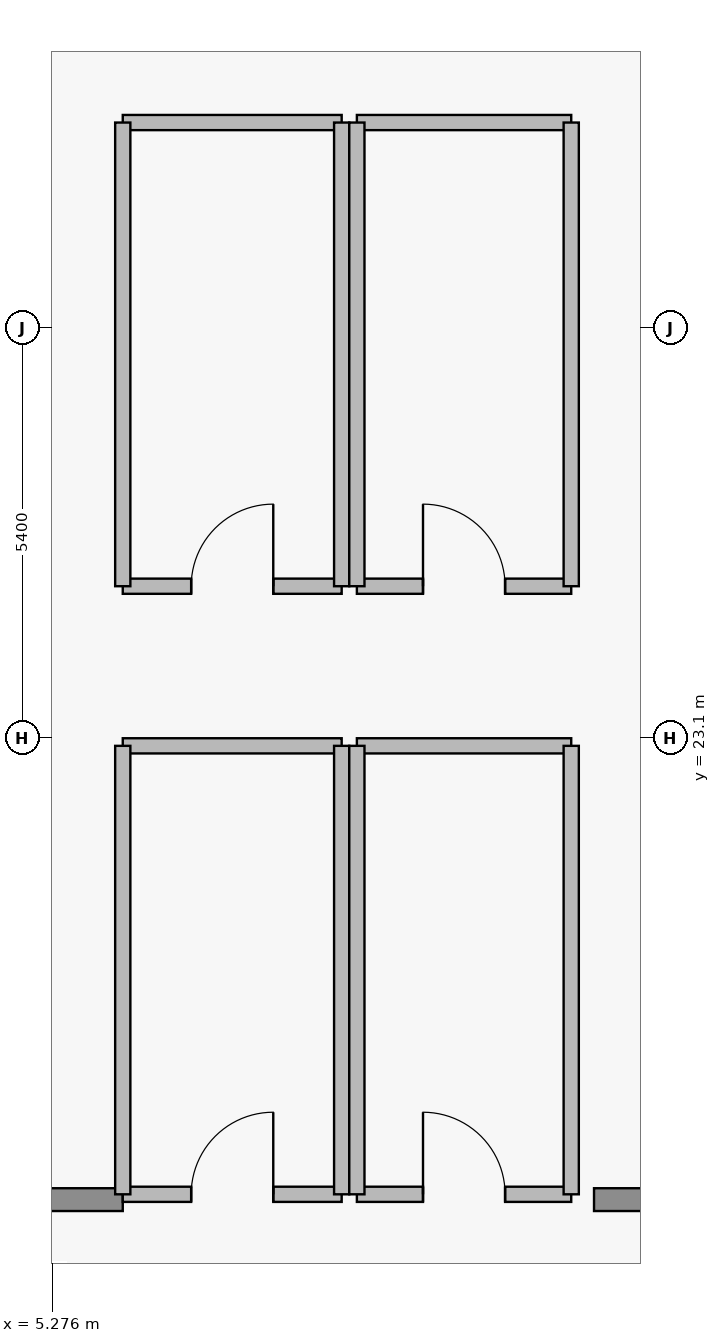
"""IFC4 building model, lengths in metres.
Left out: names, types, materials, properties, quantities, classifications, styles, units other than length and angle.
Written with IfcOpenShell. Run it as: python <this file> out.ifc"""

import sys

from ifc_helpers import new_model, si_unit, direction, frame, frame_2d, origin, place, context, subcontext, project, spatial, rectangle, extrude, element, fill, save


model = new_model("IFC4")
c1 = context("Model", 3, precision=1e-05, world=origin(), true_north=direction((0.0, 1.0)))
c2 = subcontext(c1, "Body", "Model", "MODEL_VIEW")
j1 = project(units=[si_unit("LENGTHUNIT", "METRE"), si_unit("PLANEANGLEUNIT", "RADIAN")], contexts=[c1])
p1 = place(None, origin())
s1 = spatial("IfcSite", under=j1, at=p1, CompositionType="ELEMENT")
p2 = place(p1, origin())
s2 = spatial("IfcBuilding", under=s1, at=p2, CompositionType="ELEMENT")
p3 = place(p2, frame((0.0, 0.0, 233.65)))
s3 = spatial("IfcBuildingStorey", under=s2, at=p3, CompositionType="ELEMENT", Elevation=233.65)
p4 = place(p3, frame((12.4, 17.03, 0.0), z_axis=(0.0, 0.0, 1.0), x_axis=(1.0, 0.0, 0.0)))
e1 = element("IfcWall", 1, at=p4, inside=s3, PredefinedType="STANDARD", context=c2, shape_type="SweptSolid", body=[
    extrude(rectangle(XDim=3.1, YDim=0.3, at=frame_2d((1.55, 0.0))), origin(), (0.0, 0.0, 1.0), 5.74),
])
p5 = place(p3, frame((1.05, 17.03, 0.0), z_axis=(0.0, 0.0, 1.0), x_axis=(1.0, 0.0, 0.0)))
e2 = element("IfcWall", 2, at=p5, inside=s3, PredefinedType="STANDARD", context=c2, shape_type="SweptSolid", body=[
    extrude(rectangle(XDim=5.15, YDim=0.3, at=frame_2d((2.575, 0.0))), origin(), (0.0, 0.0, 1.0), 5.74),
])
p6 = place(p3, frame((6.2, 17.1, 0.0), z_axis=(0.0, 0.0, 1.0), x_axis=(1.0, 0.0, 0.0)))
e3 = element("IfcWall", 3, at=p6, inside=s3, PredefinedType="PARTITIONING", context=c2, shape_type="SweptSolid", body=[
    extrude(rectangle(XDim=2.88, YDim=0.2, at=frame_2d((1.44, 0.0))), origin(), (0.0, 0.0, 1.0), 5.74),
])
p7 = place(p6, frame((0.9, 0.0, 0.0)))
e4 = element("IfcOpeningElement", 4, at=p7, cuts=e3, PredefinedType="OPENING", context=c2, shape_type="SweptSolid", body=[
    extrude(rectangle(XDim=1.08, YDim=2.18, at=frame_2d((0.54, 1.09))), frame((0.0, 0.11, 0.0), z_axis=(0.0, -1.0, 0.0), x_axis=(1.0, 0.0, 0.0)), (0.0, 0.0, 1.0), 0.22),
])
p8 = place(p3, frame((9.28, 17.1, 0.0), z_axis=(0.0, 0.0, 1.0), x_axis=(1.0, 0.0, 0.0)))
e5 = element("IfcWall", 5, at=p8, inside=s3, PredefinedType="PARTITIONING", context=c2, shape_type="SweptSolid", body=[
    extrude(rectangle(XDim=2.82, YDim=0.2, at=frame_2d((1.41, 0.0))), origin(), (0.0, 0.0, 1.0), 5.74),
])
p9 = place(p8, frame((0.87, 0.0, 0.0)))
e6 = element("IfcOpeningElement", 6, at=p9, cuts=e5, PredefinedType="OPENING", context=c2, shape_type="SweptSolid", body=[
    extrude(rectangle(XDim=1.08, YDim=2.18, at=frame_2d((0.54, 1.09))), frame((0.0, 0.11, 0.0), z_axis=(0.0, -1.0, 0.0), x_axis=(1.0, 0.0, 0.0)), (0.0, 0.0, 1.0), 0.22),
])
p10 = place(p3, frame((6.2, 25.1, 0.0), z_axis=(0.0, 0.0, 1.0), x_axis=(1.0, 0.0, 0.0)))
e7 = element("IfcWall", 7, at=p10, inside=s3, PredefinedType="PARTITIONING", context=c2, shape_type="SweptSolid", body=[
    extrude(rectangle(XDim=2.88, YDim=0.2, at=frame_2d((1.44, 0.0))), origin(), (0.0, 0.0, 1.0), 5.336),
])
p11 = place(p10, frame((0.9, 0.0, 0.0)))
e8 = element("IfcOpeningElement", 8, at=p11, cuts=e7, PredefinedType="OPENING", context=c2, shape_type="SweptSolid", body=[
    extrude(rectangle(XDim=1.08, YDim=2.18, at=frame_2d((0.54, 1.09))), frame((0.0, 0.11, 0.0), z_axis=(0.0, -1.0, 0.0), x_axis=(1.0, 0.0, 0.0)), (0.0, 0.0, 1.0), 0.22),
])
p12 = place(p3, frame((9.28, 25.1, 0.0), z_axis=(0.0, 0.0, 1.0), x_axis=(1.0, 0.0, 0.0)))
e9 = element("IfcWall", 9, at=p12, inside=s3, PredefinedType="PARTITIONING", context=c2, shape_type="SweptSolid", body=[
    extrude(rectangle(XDim=2.82, YDim=0.2, at=frame_2d((1.41, 0.0))), origin(), (0.0, 0.0, 1.0), 5.336),
])
p13 = place(p12, frame((0.87, 0.0, 0.0)))
e10 = element("IfcOpeningElement", 10, at=p13, cuts=e9, PredefinedType="OPENING", context=c2, shape_type="SweptSolid", body=[
    extrude(rectangle(XDim=1.08, YDim=2.18, at=frame_2d((0.54, 1.09))), frame((0.0, 0.11, 0.0), z_axis=(0.0, -1.0, 0.0), x_axis=(1.0, 0.0, 0.0)), (0.0, 0.0, 1.0), 0.22),
])
p14 = place(p3, frame((6.2, 23.0, 0.0), z_axis=(0.0, 0.0, 1.0), x_axis=(1.0, 0.0, 0.0)))
e11 = element("IfcWall", 11, at=p14, inside=s3, PredefinedType="PARTITIONING", context=c2, shape_type="SweptSolid", body=[
    extrude(rectangle(XDim=2.88, YDim=0.2, at=frame_2d((1.44, 0.0))), origin(), (0.0, 0.0, 1.0), 5.74),
])
for number, where, z_axis, x_axis in (
    (12, (6.2, 17.1, 0.0), (0.0, 0.0, 1.0), (0.0, 1.0, 0.0)),
    (13, (9.08, 17.1, 0.0), (0.0, 0.0, 1.0), (0.0, 1.0, 0.0)),
):
    element("IfcWall", number, at=place(p3, frame(where, z_axis=z_axis, x_axis=x_axis)), inside=s3, PredefinedType="PARTITIONING", context=c2, shape_type="SweptSolid", body=[
        extrude(rectangle(XDim=5.9, YDim=0.2, at=frame_2d((2.95, 0.0))), origin(), (0.0, 0.0, 1.0), 5.74),
    ])
p15 = place(p3, frame((9.28, 23.0, 0.0), z_axis=(0.0, 0.0, 1.0), x_axis=(1.0, 0.0, 0.0)))
e14 = element("IfcWall", 14, at=p15, inside=s3, PredefinedType="PARTITIONING", context=c2, shape_type="SweptSolid", body=[
    extrude(rectangle(XDim=2.82, YDim=0.2, at=frame_2d((1.41, 0.0))), origin(), (0.0, 0.0, 1.0), 5.74),
])
for number, where, z_axis, x_axis in (
    (15, (9.28, 17.1, 0.0), (0.0, 0.0, 1.0), (0.0, 1.0, 0.0)),
    (16, (12.1, 17.1, 0.0), (0.0, 0.0, 1.0), (0.0, 1.0, 0.0)),
):
    element("IfcWall", number, at=place(p3, frame(where, z_axis=z_axis, x_axis=x_axis)), inside=s3, PredefinedType="PARTITIONING", context=c2, shape_type="SweptSolid", body=[
        extrude(rectangle(XDim=5.9, YDim=0.2, at=frame_2d((2.95, 0.0))), origin(), (0.0, 0.0, 1.0), 5.74),
    ])
p16 = place(p3, frame((6.2, 31.2, 0.0), z_axis=(0.0, 0.0, 1.0), x_axis=(1.0, 0.0, 0.0)))
e17 = element("IfcWall", 17, at=p16, inside=s3, PredefinedType="PARTITIONING", context=c2, shape_type="SweptSolid", body=[
    extrude(rectangle(XDim=2.88, YDim=0.2, at=frame_2d((1.44, 0.0))), origin(), (0.0, 0.0, 1.0), 5.74),
])
for number, where, z_axis, x_axis in (
    (18, (6.2, 25.1, 0.0), (0.0, 0.0, 1.0), (0.0, 1.0, 0.0)),
    (19, (9.08, 25.1, 0.0), (0.0, 0.0, 1.0), (0.0, 1.0, 0.0)),
):
    element("IfcWall", number, at=place(p3, frame(where, z_axis=z_axis, x_axis=x_axis)), inside=s3, PredefinedType="PARTITIONING", context=c2, shape_type="SweptSolid", body=[
        extrude(rectangle(XDim=6.1, YDim=0.2, at=frame_2d((3.05, 0.0))), origin(), (0.0, 0.0, 1.0), 5.74),
    ])
p17 = place(p3, frame((9.28, 31.2, 0.0), z_axis=(0.0, 0.0, 1.0), x_axis=(1.0, 0.0, 0.0)))
e20 = element("IfcWall", 20, at=p17, inside=s3, PredefinedType="PARTITIONING", context=c2, shape_type="SweptSolid", body=[
    extrude(rectangle(XDim=2.82, YDim=0.2, at=frame_2d((1.41, 0.0))), origin(), (0.0, 0.0, 1.0), 5.74),
])
for number, where, z_axis, x_axis in (
    (21, (9.28, 25.1, 0.0), (0.0, 0.0, 1.0), (0.0, 1.0, 0.0)),
    (22, (12.1, 25.1, 0.0), (0.0, 0.0, 1.0), (0.0, 1.0, 0.0)),
):
    element("IfcWall", number, at=place(p3, frame(where, z_axis=z_axis, x_axis=x_axis)), inside=s3, PredefinedType="PARTITIONING", context=c2, shape_type="SweptSolid", body=[
        extrude(rectangle(XDim=6.1, YDim=0.2, at=frame_2d((3.05, 0.0))), origin(), (0.0, 0.0, 1.0), 5.74),
    ])
p18 = place(p7, origin())
e23 = element("IfcDoor", 23, at=p18, inside=s3, OperationType="SINGLE_SWING_RIGHT", PredefinedType="DOOR", context=c2, shape_type="SweptSolid", body=[
    extrude(rectangle(XDim=1.08, YDim=2.18, at=frame_2d((0.54, 1.09))), frame((0.0, 0.025, 0.0), z_axis=(0.0, -1.0, 0.0), x_axis=(1.0, 0.0, 0.0)), (0.0, 0.0, 1.0), 0.05),
])
fill(e4, e23)
p19 = place(p9, origin())
e24 = element("IfcDoor", 24, at=p19, inside=s3, OperationType="SINGLE_SWING_LEFT", PredefinedType="DOOR", context=c2, shape_type="SweptSolid", body=[
    extrude(rectangle(XDim=1.08, YDim=2.18, at=frame_2d((0.54, 1.09))), frame((0.0, 0.025, 0.0), z_axis=(0.0, -1.0, 0.0), x_axis=(1.0, 0.0, 0.0)), (0.0, 0.0, 1.0), 0.05),
])
fill(e6, e24)
p20 = place(p11, origin())
e25 = element("IfcDoor", 25, at=p20, inside=s3, OperationType="SINGLE_SWING_RIGHT", PredefinedType="DOOR", context=c2, shape_type="SweptSolid", body=[
    extrude(rectangle(XDim=1.08, YDim=2.18, at=frame_2d((0.54, 1.09))), frame((0.0, 0.025, 0.0), z_axis=(0.0, -1.0, 0.0), x_axis=(1.0, 0.0, 0.0)), (0.0, 0.0, 1.0), 0.05),
])
fill(e8, e25)
p21 = place(p13, origin())
e26 = element("IfcDoor", 26, at=p21, inside=s3, OperationType="SINGLE_SWING_LEFT", PredefinedType="DOOR", context=c2, shape_type="SweptSolid", body=[
    extrude(rectangle(XDim=1.08, YDim=2.18, at=frame_2d((0.54, 1.09))), frame((0.0, 0.025, 0.0), z_axis=(0.0, -1.0, 0.0), x_axis=(1.0, 0.0, 0.0)), (0.0, 0.0, 1.0), 0.05),
])
fill(e10, e26)
save(model, sys.argv[1])
